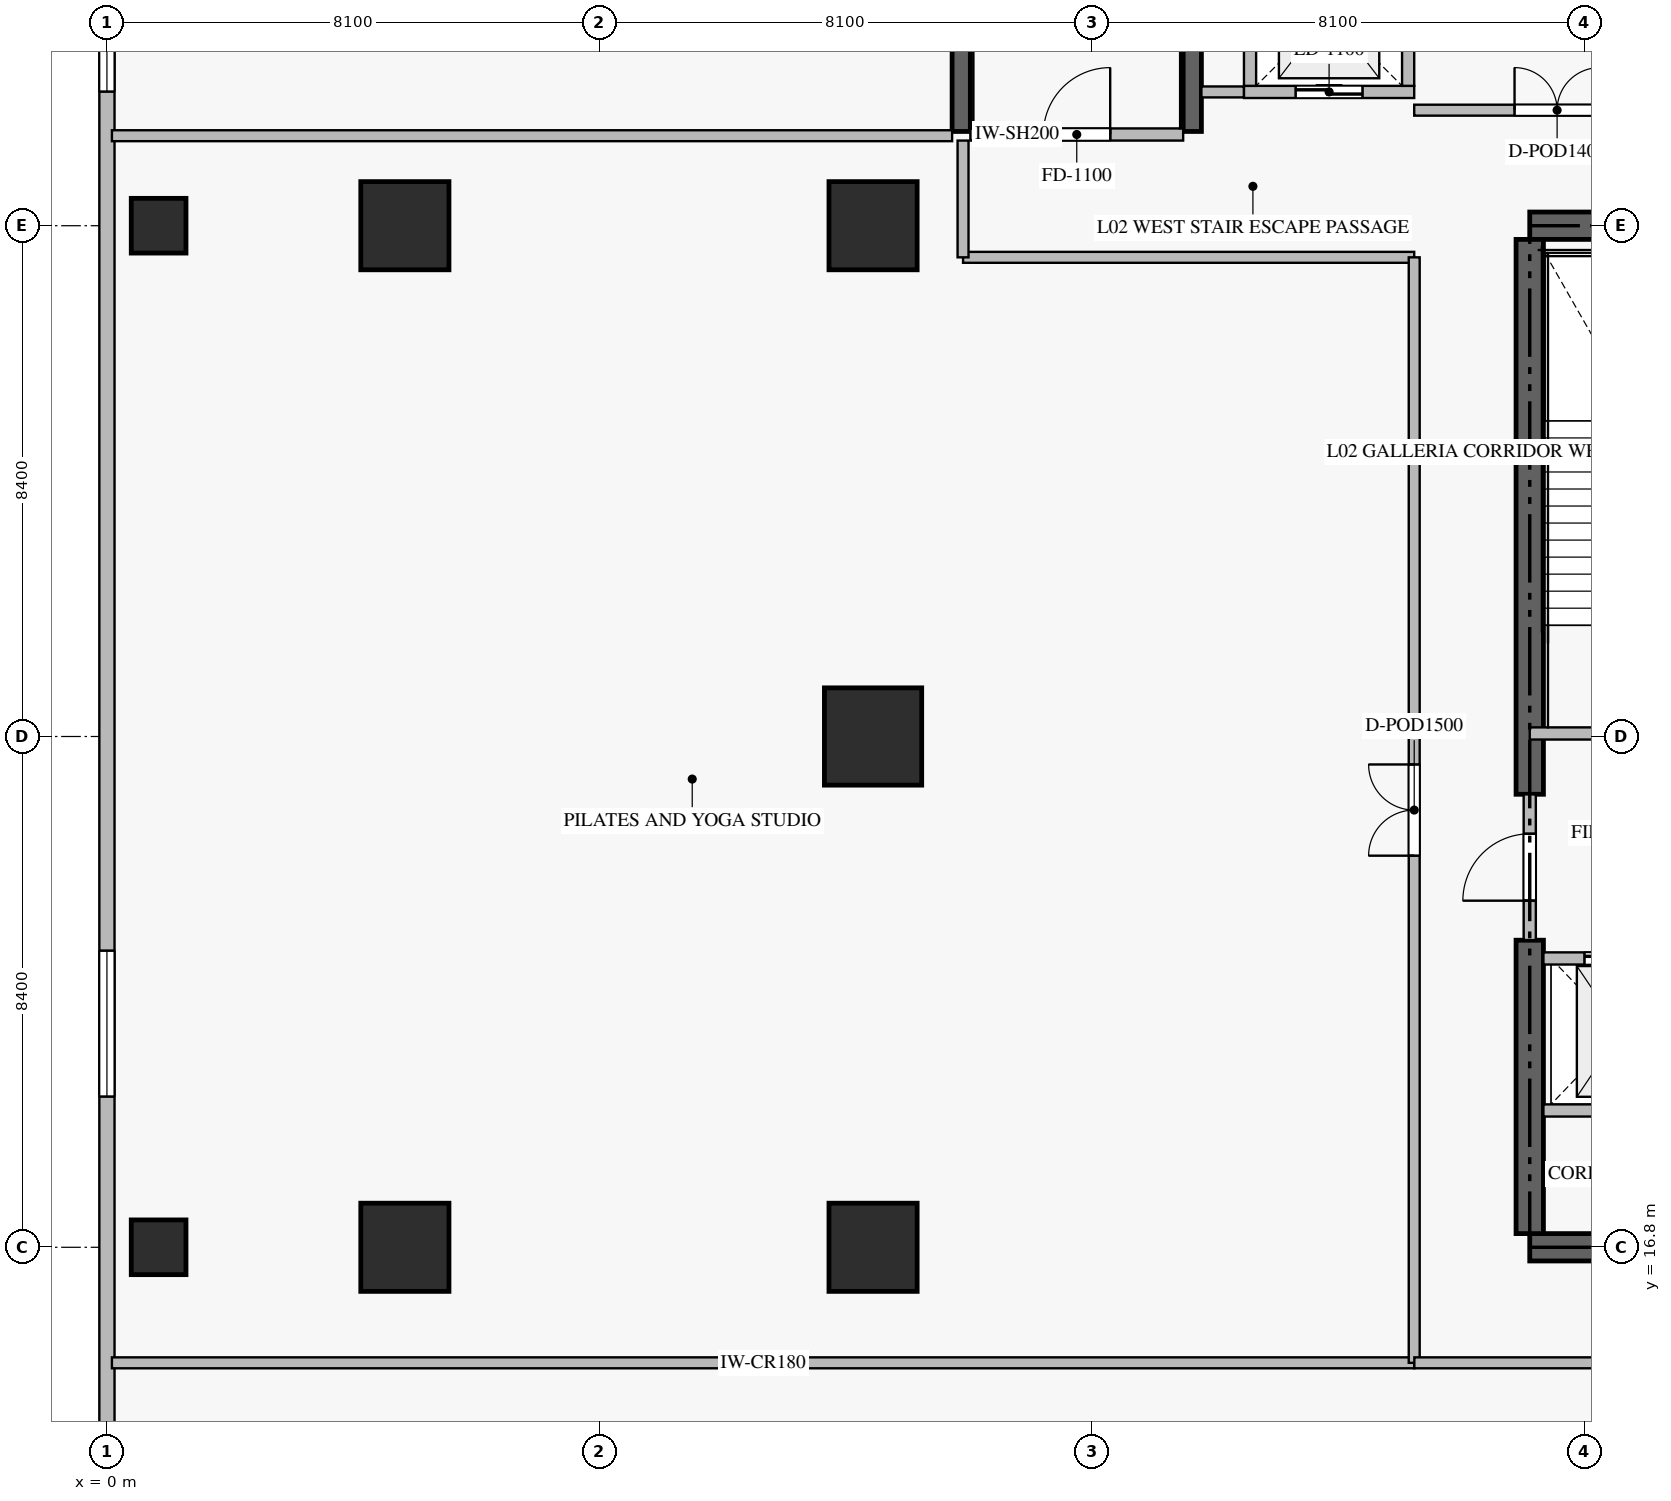
"""IFC4 building model, lengths in metres.
Left out: names, types, materials, properties, quantities, classifications, styles, units other than length and angle.
Written with IfcOpenShell. Run it as: python <this file> out.ifc"""

import sys

from ifc_helpers import new_model, si_unit, direction, frame, frame_2d, origin, origin_2d, place, context, subcontext, project, spatial, rectangle, extrude, source, transform, mapped, element, fill, save


model = new_model("IFC4")
c1 = context("Model", 3, precision=1e-05, world=origin(), true_north=direction((0.0, 1.0)))
c2 = subcontext(c1, "Body", "Model", "MODEL_VIEW")
j1 = project(units=[si_unit("LENGTHUNIT", "METRE"), si_unit("PLANEANGLEUNIT", "RADIAN")], contexts=[c1])
p1 = place(None, origin())
s1 = spatial("IfcSite", under=j1, at=p1, CompositionType="ELEMENT")
p2 = place(p1, origin())
s2 = spatial("IfcBuilding", under=s1, at=p2, CompositionType="ELEMENT")
p3 = place(p2, frame((0.0, 0.0, 10.5)))
s3 = spatial("IfcBuildingStorey", under=s2, at=p3, CompositionType="ELEMENT", Elevation=10.5)
for number, where, z_axis, x_axis in (
    (1, (23.4, 16.8, -0.38), (0.0, 0.0, 1.0), (1.0, 0.0, 0.0)),
    (2, (41.4, 33.6, -0.38), (0.0, 0.0, 1.0), (-1.0, 0.0, 0.0)),
):
    element("IfcWall", number, at=place(p3, frame(where, z_axis=z_axis, x_axis=x_axis)), inside=s3, PredefinedType="SHEAR", context=c2, shape_type="SweptSolid", body=[
        extrude(rectangle(XDim=18.0, YDim=0.45, at=frame_2d((9.0, 0.0))), origin(), (0.0, 0.0, 1.0), 4.798),
    ])
p4 = place(p3, frame((23.4, 17.025, -0.38), z_axis=(0.0, 0.0, 1.0), x_axis=(0.0, 1.0, 0.0)))
e3 = element("IfcWall", 3, at=p4, inside=s3, PredefinedType="SHEAR", context=c2, shape_type="SweptSolid", body=[
    extrude(rectangle(XDim=4.825, YDim=0.45, at=frame_2d((2.413, 0.0))), origin(), (0.0, 0.0, 1.0), 4.798),
])
p5 = place(p3, frame((23.4, 24.25, -0.38), z_axis=(0.0, 0.0, 1.0), x_axis=(0.0, 1.0, 0.0)))
e4 = element("IfcWall", 4, at=p5, inside=s3, PredefinedType="SHEAR", context=c2, shape_type="SweptSolid", body=[
    extrude(rectangle(XDim=9.125, YDim=0.45, at=frame_2d((4.562, 0.0))), origin(), (0.0, 0.0, 1.0), 4.798),
])
m1 = source(origin(), c2, "Body", "SweptSolid", [
    extrude(rectangle(XDim=0.9, YDim=0.9, at=origin_2d()), origin(), (0.0, 0.0, 1.0), 4.8),
])
for number, where, z_axis, x_axis in (
    (5, (0.85, 16.8, -0.38), (0.0, 0.0, 1.0), (1.0, 0.0, 0.0)),
    (6, (0.85, 33.6, -0.38), (0.0, 0.0, 1.0), (1.0, 0.0, 0.0)),
):
    element("IfcColumn", number, at=place(p3, frame(where, z_axis=z_axis, x_axis=x_axis)), inside=s3, PredefinedType="COLUMN", context=c2, shape_type="MappedRepresentation", body=[
        mapped(m1, transform((0.0, 0.0, 0.0), scale=1.0)),
    ])
m2 = source(origin(), c2, "Body", "SweptSolid", [
    extrude(rectangle(XDim=1.45, YDim=1.45, at=origin_2d()), origin(), (0.0, 0.0, 1.0), 4.8),
])
p6 = place(p3, frame((12.6, 16.8, -0.38), z_axis=(0.0, 0.0, 1.0), x_axis=(1.0, 0.0, 0.0)))
e7 = element("IfcColumn", 7, at=p6, inside=s3, PredefinedType="COLUMN", context=c2, shape_type="MappedRepresentation", body=[
    mapped(m2, transform((0.0, 0.0, 0.0), scale=1.0)),
])
m3 = source(origin(), c2, "Body", "SweptSolid", [
    extrude(rectangle(XDim=1.6, YDim=1.6, at=origin_2d()), origin(), (0.0, 0.0, 1.0), 4.8),
])
p7 = place(p3, frame((12.6, 25.2, -0.38), z_axis=(0.0, 0.0, 1.0), x_axis=(1.0, 0.0, 0.0)))
e8 = element("IfcColumn", 8, at=p7, inside=s3, PredefinedType="COLUMN", context=c2, shape_type="MappedRepresentation", body=[
    mapped(m3, transform((0.0, 0.0, 0.0), scale=1.0)),
])
for number, where, z_axis, x_axis in (
    (9, (12.6, 33.6, -0.38), (0.0, 0.0, 1.0), (1.0, 0.0, 0.0)),
    (10, (4.9, 16.8, -0.38), (0.0, 0.0, 1.0), (1.0, 0.0, 0.0)),
    (11, (4.9, 33.6, -0.38), (0.0, 0.0, 1.0), (1.0, 0.0, 0.0)),
):
    element("IfcColumn", number, at=place(p3, frame(where, z_axis=z_axis, x_axis=x_axis)), inside=s3, PredefinedType="COLUMN", context=c2, shape_type="MappedRepresentation", body=[
        mapped(m2, transform((0.0, 0.0, 0.0), scale=1.0)),
    ])
p8 = place(p3, frame((0.0, 46.075, 0.0), z_axis=(0.0, 0.0, 1.0), x_axis=(0.0, -1.0, 0.0)))
e12 = element("IfcWall", 12, at=p8, inside=s3, PredefinedType="ELEMENTEDWALL", context=c2, shape_type="SweptSolid", body=[
    extrude(rectangle(XDim=41.75, YDim=0.25, at=frame_2d((20.875, 0.0))), origin(), (0.0, 0.0, 1.0), 4.405),
])
p9 = place(p8, frame((7.87, 0.0, 0.6)))
e13 = element("IfcOpeningElement", 13, at=p9, cuts=e12, PredefinedType="OPENING", context=c2, shape_type="SweptSolid", body=[
    extrude(rectangle(XDim=2.4, YDim=2.6, at=frame_2d((1.2, 1.3))), frame((0.0, 0.135, 0.0), z_axis=(0.0, -1.0, 0.0), x_axis=(1.0, 0.0, 0.0)), (0.0, 0.0, 1.0), 0.27),
])
p10 = place(p8, frame((24.397, 0.0, 0.6)))
e14 = element("IfcOpeningElement", 14, at=p10, cuts=e12, PredefinedType="OPENING", context=c2, shape_type="SweptSolid", body=[
    extrude(rectangle(XDim=2.4, YDim=2.6, at=frame_2d((1.2, 1.3))), frame((0.0, 0.135, 0.0), z_axis=(0.0, -1.0, 0.0), x_axis=(1.0, 0.0, 0.0)), (0.0, 0.0, 1.0), 0.27),
])
p11 = place(p3, frame((23.4, 25.25, 0.0), z_axis=(0.0, 0.0, 1.0), x_axis=(1.0, 0.0, 0.0)))
e15 = element("IfcWall", 15, at=p11, inside=s3, PredefinedType="STANDARD", context=c2, shape_type="SweptSolid", body=[
    extrude(rectangle(XDim=4.45, YDim=0.2, at=frame_2d((2.225, 0.0))), origin(), (0.0, 0.0, 1.0), 4.42),
])
p12 = place(p11, frame((1.65, 0.0, 0.0)))
e16 = element("IfcOpeningElement", 16, at=p12, cuts=e15, PredefinedType="OPENING", context=c2, shape_type="SweptSolid", body=[
    extrude(rectangle(XDim=1.1, YDim=2.15, at=frame_2d((0.55, 1.075))), frame((0.0, 0.11, 0.0), z_axis=(0.0, -1.0, 0.0), x_axis=(1.0, 0.0, 0.0)), (0.0, 0.0, 1.0), 0.22),
])
for number, where, z_axis, x_axis in (
    (17, (14.05, 35.15, -0.38), (0.0, 0.0, 1.0), (0.0, 1.0, 0.0)),
    (18, (17.85, 35.15, -0.38), (0.0, 0.0, 1.0), (0.0, 1.0, 0.0)),
):
    element("IfcWall", number, at=place(p3, frame(where, z_axis=z_axis, x_axis=x_axis)), inside=s3, PredefinedType="SHEAR", context=c2, shape_type="SweptSolid", body=[
        extrude(rectangle(XDim=7.9, YDim=0.3, at=frame_2d((3.95, 0.0))), origin(), (0.0, 0.0, 1.0), 4.798),
    ])
p13 = place(p3, frame((14.2, 35.1, 0.0), z_axis=(0.0, 0.0, 1.0), x_axis=(1.0, 0.0, 0.0)))
e19 = element("IfcWall", 19, at=p13, inside=s3, PredefinedType="STANDARD", context=c2, shape_type="SweptSolid", body=[
    extrude(rectangle(XDim=3.5, YDim=0.2, at=frame_2d((1.75, 0.0))), origin(), (0.0, 0.0, 1.0), 4.42),
])
p14 = place(p13, frame((1.2, 0.0, 0.0)))
e20 = element("IfcOpeningElement", 20, at=p14, cuts=e19, PredefinedType="OPENING", context=c2, shape_type="SweptSolid", body=[
    extrude(rectangle(XDim=1.1, YDim=2.15, at=frame_2d((0.55, 1.075))), frame((0.0, 0.11, 0.0), z_axis=(0.0, -1.0, 0.0), x_axis=(1.0, 0.0, 0.0)), (0.0, 0.0, 1.0), 0.22),
])
p15 = place(p3, frame((23.625, 21.55, 0.0), z_axis=(0.0, 0.0, 1.0), x_axis=(1.0, 0.0, 0.0)))
e21 = element("IfcWall", 21, at=p15, inside=s3, PredefinedType="STANDARD", context=c2, shape_type="SweptSolid", body=[
    extrude(rectangle(XDim=2.425, YDim=0.2, at=frame_2d((1.212, 0.0))), origin(), (0.0, 0.0, 1.0), 4.42),
])
p16 = place(p15, frame((0.675, 0.0, 0.0)))
e22 = element("IfcOpeningElement", 22, at=p16, cuts=e21, PredefinedType="OPENING", context=c2, shape_type="SweptSolid", body=[
    extrude(rectangle(XDim=1.2, YDim=2.2, at=frame_2d((0.6, 1.1))), frame((0.0, 0.11, 0.0), z_axis=(0.0, -1.0, 0.0), x_axis=(1.0, 0.0, 0.0)), (0.0, 0.0, 1.0), 0.22),
])
p17 = place(p3, frame((18.7, 35.8, 0.0), z_axis=(0.0, 0.0, 1.0), x_axis=(1.0, 0.0, 0.0)))
e23 = element("IfcWall", 23, at=p17, inside=s3, PredefinedType="STANDARD", context=c2, shape_type="SweptSolid", body=[
    extrude(rectangle(XDim=2.8, YDim=0.2, at=frame_2d((1.4, 0.0))), origin(), (0.0, 0.0, 1.0), 4.42),
])
p18 = place(p17, frame((0.85, 0.0, 0.0)))
e24 = element("IfcOpeningElement", 24, at=p18, cuts=e23, PredefinedType="OPENING", context=c2, shape_type="SweptSolid", body=[
    extrude(rectangle(XDim=1.1, YDim=2.2, at=frame_2d((0.55, 1.1))), frame((0.0, 0.11, 0.0), z_axis=(0.0, -1.0, 0.0), x_axis=(1.0, 0.0, 0.0)), (0.0, 0.0, 1.0), 0.22),
])
for number, where, z_axis, x_axis in (
    (25, (18.8, 35.9, 0.0), (0.0, 0.0, 1.0), (0.0, 1.0, 0.0)),
    (26, (21.4, 35.9, 0.0), (0.0, 0.0, 1.0), (0.0, 1.0, 0.0)),
):
    element("IfcWall", number, at=place(p3, frame(where, z_axis=z_axis, x_axis=x_axis)), inside=s3, PredefinedType="STANDARD", context=c2, shape_type="SweptSolid", body=[
        extrude(rectangle(XDim=2.4, YDim=0.2, at=frame_2d((1.2, 0.0))), origin(), (0.0, 0.0, 1.0), 4.42),
    ])
p19 = place(p3, frame((23.625, 19.05, 0.0), z_axis=(0.0, 0.0, 1.0), x_axis=(1.0, 0.0, 0.0)))
e27 = element("IfcWall", 27, at=p19, inside=s3, PredefinedType="STANDARD", context=c2, shape_type="SweptSolid", body=[
    extrude(rectangle(XDim=2.425, YDim=0.2, at=frame_2d((1.212, 0.0))), origin(), (0.0, 0.0, 1.0), 4.42),
])
p20 = place(p3, frame((23.4, 21.852, 0.0), z_axis=(0.0, 0.0, 1.0), x_axis=(0.0, 1.0, 0.0)))
e28 = element("IfcWall", 28, at=p20, inside=s3, PredefinedType="STANDARD", context=c2, shape_type="SweptSolid", body=[
    extrude(rectangle(XDim=2.396, YDim=0.2, at=frame_2d((1.198, 0.0))), origin(), (0.0, 0.0, 1.0), 4.42),
])
p21 = place(p20, frame((0.648, 0.0, 0.0)))
e29 = element("IfcOpeningElement", 29, at=p21, cuts=e28, PredefinedType="OPENING", context=c2, shape_type="SweptSolid", body=[
    extrude(rectangle(XDim=1.1, YDim=2.15, at=frame_2d((0.55, 1.075))), frame((0.0, 0.11, 0.0), z_axis=(0.0, -1.0, 0.0), x_axis=(1.0, 0.0, 0.0)), (0.0, 0.0, 1.0), 0.22),
])
p22 = place(p3, frame((0.082, 14.9, 0.0), z_axis=(0.0, 0.0, 1.0), x_axis=(1.0, 0.0, 0.0)))
e30 = element("IfcWall", 30, at=p22, inside=s3, PredefinedType="PARTITIONING", context=c2, shape_type="SweptSolid", body=[
    extrude(rectangle(XDim=21.418, YDim=0.18, at=frame_2d((10.709, 0.0))), origin(), (0.0, 0.0, 1.0), 4.42),
])
p23 = place(p3, frame((0.082, 35.08, 0.0), z_axis=(0.0, 0.0, 1.0), x_axis=(1.0, 0.0, 0.0)))
e31 = element("IfcWall", 31, at=p23, inside=s3, PredefinedType="PARTITIONING", context=c2, shape_type="SweptSolid", body=[
    extrude(rectangle(XDim=13.818, YDim=0.18, at=frame_2d((6.909, 0.0))), origin(), (0.0, 0.0, 1.0), 4.42),
])
p24 = place(p3, frame((14.08, 33.08, 0.0), z_axis=(0.0, 0.0, 1.0), x_axis=(1.0, 0.0, 0.0)))
e32 = element("IfcWall", 32, at=p24, inside=s3, PredefinedType="PARTITIONING", context=c2, shape_type="SweptSolid", body=[
    extrude(rectangle(XDim=7.42, YDim=0.18, at=frame_2d((3.71, 0.0))), origin(), (0.0, 0.0, 1.0), 4.42),
])
p25 = place(p3, frame((18.0, 35.8, 0.0), z_axis=(0.0, 0.0, 1.0), x_axis=(1.0, 0.0, 0.0)))
e33 = element("IfcWall", 33, at=p25, inside=s3, PredefinedType="PARTITIONING", context=c2, shape_type="SweptSolid", body=[
    extrude(rectangle(XDim=0.698, YDim=0.18, at=frame_2d((0.349, 0.0))), origin(), (0.0, 0.0, 1.0), 4.42),
])
p26 = place(p3, frame((14.08, 33.08, 0.0), z_axis=(0.0, 0.0, 1.0), x_axis=(0.0, 1.0, 0.0)))
e34 = element("IfcWall", 34, at=p26, inside=s3, PredefinedType="PARTITIONING", context=c2, shape_type="SweptSolid", body=[
    extrude(rectangle(XDim=1.92, YDim=0.18, at=frame_2d((0.96, 0.0))), origin(), (0.0, 0.0, 1.0), 4.42),
])
p27 = place(p3, frame((21.5, 14.9, 0.0), z_axis=(0.0, 0.0, 1.0), x_axis=(0.0, 1.0, 0.0)))
e35 = element("IfcWall", 35, at=p27, inside=s3, PredefinedType="PARTITIONING", context=c2, shape_type="SweptSolid", body=[
    extrude(rectangle(XDim=18.18, YDim=0.18, at=frame_2d((9.09, 0.0))), origin(), (0.0, 0.0, 1.0), 4.42),
])
p28 = place(p27, frame((8.34, 0.0, 0.0)))
e36 = element("IfcOpeningElement", 36, at=p28, cuts=e35, PredefinedType="OPENING", context=c2, shape_type="SweptSolid", body=[
    extrude(rectangle(XDim=1.5, YDim=2.25, at=frame_2d((0.75, 1.125))), frame((0.0, 0.1, 0.0), z_axis=(0.0, -1.0, 0.0), x_axis=(1.0, 0.0, 0.0)), (0.0, 0.0, 1.0), 0.2),
])
p29 = place(p3, frame((21.502, 14.9, 0.0), z_axis=(0.0, 0.0, 1.0), x_axis=(1.0, 0.0, 0.0)))
e37 = element("IfcWall", 37, at=p29, inside=s3, PredefinedType="PARTITIONING", context=c2, shape_type="SweptSolid", body=[
    extrude(rectangle(XDim=9.298, YDim=0.18, at=frame_2d((4.649, 0.0))), origin(), (0.0, 0.0, 1.0), 4.42),
])
p30 = place(p29, frame((3.899, 0.0, 0.0)))
e38 = element("IfcOpeningElement", 38, at=p30, cuts=e37, PredefinedType="OPENING", context=c2, shape_type="SweptSolid", body=[
    extrude(rectangle(XDim=1.5, YDim=2.25, at=frame_2d((0.75, 1.125))), frame((0.0, 0.1, 0.0), z_axis=(0.0, -1.0, 0.0), x_axis=(1.0, 0.0, 0.0)), (0.0, 0.0, 1.0), 0.2),
])
p31 = place(p3, frame((21.5, 35.5, 0.0), z_axis=(0.0, 0.0, 1.0), x_axis=(1.0, 0.0, 0.0)))
e39 = element("IfcWall", 39, at=p31, inside=s3, PredefinedType="PARTITIONING", context=c2, shape_type="SweptSolid", body=[
    extrude(rectangle(XDim=4.7, YDim=0.18, at=frame_2d((2.35, 0.0))), origin(), (0.0, 0.0, 1.0), 4.42),
])
p32 = place(p31, frame((1.65, 0.0, 0.0)))
e40 = element("IfcOpeningElement", 40, at=p32, cuts=e39, PredefinedType="OPENING", context=c2, shape_type="SweptSolid", body=[
    extrude(rectangle(XDim=1.4, YDim=2.25, at=frame_2d((0.7, 1.125))), frame((0.0, 0.1, 0.0), z_axis=(0.0, -1.0, 0.0), x_axis=(1.0, 0.0, 0.0)), (0.0, 0.0, 1.0), 0.2),
])
m4 = source(origin(), c2, "Body", "SweptSolid", [
    extrude(rectangle(XDim=2.4, YDim=2.6, at=frame_2d((1.2, 1.3))), frame((0.0, 0.03, 0.0), z_axis=(0.0, -1.0, 0.0), x_axis=(1.0, 0.0, 0.0)), (0.0, 0.0, 1.0), 0.06),
])
p33 = place(p9, origin())
e41 = element("IfcWindow", 41, at=p33, inside=s3, PartitioningType="SINGLE_PANEL", PredefinedType="WINDOW", context=c2, shape_type="MappedRepresentation", body=[
    mapped(m4, transform((0.0, 0.0, 0.0), scale=1.0)),
])
fill(e13, e41)
p34 = place(p10, origin())
e42 = element("IfcWindow", 42, at=p34, inside=s3, PartitioningType="SINGLE_PANEL", PredefinedType="WINDOW", context=c2, shape_type="MappedRepresentation", body=[
    mapped(m4, transform((0.0, 0.0, 0.0), scale=1.0)),
])
fill(e14, e42)
m5 = source(origin(), c2, "Body", "SweptSolid", [
    extrude(rectangle(XDim=1.1, YDim=2.15, at=frame_2d((0.55, 1.075))), frame((0.0, 0.025, 0.0), z_axis=(0.0, -1.0, 0.0), x_axis=(1.0, 0.0, 0.0)), (0.0, 0.0, 1.0), 0.05),
])
p35 = place(p14, origin())
e43 = element("IfcDoor", 43, at=p35, inside=s3, OperationType="SINGLE_SWING_RIGHT", PredefinedType="DOOR", context=c2, shape_type="MappedRepresentation", body=[
    mapped(m5, transform((0.0, 0.0, 0.0), scale=1.0)),
])
fill(e20, e43)
m6 = source(origin(), c2, "Body", "SweptSolid", [
    extrude(rectangle(XDim=1.2, YDim=2.2, at=frame_2d((0.6, 1.1))), frame((0.0, 0.025, 0.0), z_axis=(0.0, -1.0, 0.0), x_axis=(1.0, 0.0, 0.0)), (0.0, 0.0, 1.0), 0.05),
])
p36 = place(p16, origin())
e44 = element("IfcDoor", 44, at=p36, inside=s3, OperationType="DOUBLE_DOOR_SLIDING", PredefinedType="DOOR", context=c2, shape_type="MappedRepresentation", body=[
    mapped(m6, transform((0.0, 0.0, 0.0), scale=1.0)),
])
fill(e22, e44)
m7 = source(origin(), c2, "Body", "SweptSolid", [
    extrude(rectangle(XDim=1.1, YDim=2.2, at=frame_2d((0.55, 1.1))), frame((0.0, 0.025, 0.0), z_axis=(0.0, -1.0, 0.0), x_axis=(1.0, 0.0, 0.0)), (0.0, 0.0, 1.0), 0.05),
])
p37 = place(p18, origin())
e45 = element("IfcDoor", 45, at=p37, inside=s3, OperationType="DOUBLE_DOOR_SLIDING", PredefinedType="DOOR", context=c2, shape_type="MappedRepresentation", body=[
    mapped(m7, transform((0.0, 0.0, 0.0), scale=1.0)),
])
fill(e24, e45)
p38 = place(p21, origin())
e46 = element("IfcDoor", 46, at=p38, inside=s3, OperationType="SINGLE_SWING_LEFT", PredefinedType="DOOR", context=c2, shape_type="MappedRepresentation", body=[
    mapped(m5, transform((0.0, 0.0, 0.0), scale=1.0)),
])
fill(e29, e46)
m8 = source(origin(), c2, "Body", "SweptSolid", [
    extrude(rectangle(XDim=1.5, YDim=2.25, at=frame_2d((0.75, 1.125))), frame((0.0, 0.025, 0.0), z_axis=(0.0, -1.0, 0.0), x_axis=(1.0, 0.0, 0.0)), (0.0, 0.0, 1.0), 0.05),
])
p39 = place(p28, origin())
e47 = element("IfcDoor", 47, at=p39, inside=s3, OperationType="DOUBLE_DOOR_SINGLE_SWING", PredefinedType="DOOR", context=c2, shape_type="MappedRepresentation", body=[
    mapped(m8, transform((0.0, 0.0, 0.0), scale=1.0)),
])
fill(e36, e47)
m9 = source(origin(), c2, "Body", "SweptSolid", [
    extrude(rectangle(XDim=1.4, YDim=2.25, at=frame_2d((0.7, 1.125))), frame((0.0, 0.025, 0.0), z_axis=(0.0, -1.0, 0.0), x_axis=(1.0, 0.0, 0.0)), (0.0, 0.0, 1.0), 0.05),
])
p40 = place(p32, origin())
e48 = element("IfcDoor", 48, at=p40, inside=s3, OperationType="DOUBLE_DOOR_SINGLE_SWING", PredefinedType="DOOR", context=c2, shape_type="MappedRepresentation", body=[
    mapped(m9, transform((0.0, 0.0, 0.0), scale=1.0)),
])
fill(e40, e48)
save(model, sys.argv[1])
